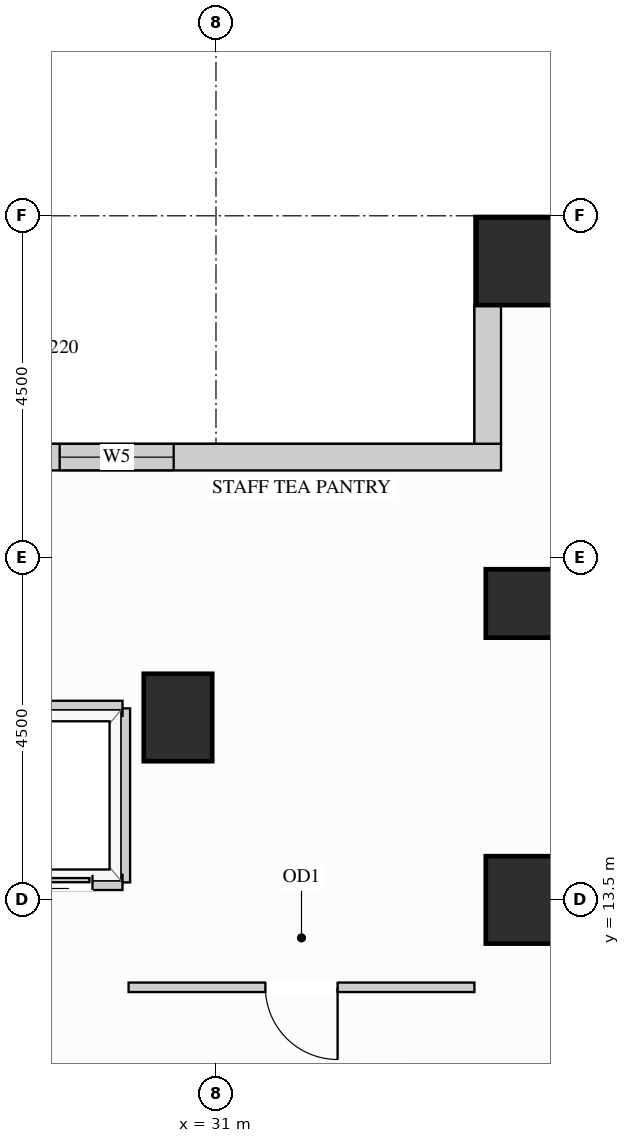
"""IFC4 building model, lengths in metres.
Left out: names, types, materials, properties, quantities, classifications, styles, units other than length and angle.
Written with IfcOpenShell. Run it as: python <this file> out.ifc"""

import sys

from ifc_helpers import new_model, si_unit, direction, frame, frame_2d, origin, origin_2d, place, context, subcontext, project, spatial, rectangle, extrude, source, transform, mapped, element, fill, save


model = new_model("IFC4")
c1 = context("Model", 3, precision=1e-05, world=origin(), true_north=direction((0.0, 1.0)))
c2 = subcontext(c1, "Body", "Model", "MODEL_VIEW")
j1 = project(units=[si_unit("LENGTHUNIT", "METRE"), si_unit("PLANEANGLEUNIT", "RADIAN")], contexts=[c1])
p1 = place(None, origin())
s1 = spatial("IfcSite", under=j1, at=p1, CompositionType="ELEMENT")
p2 = place(p1, origin())
s2 = spatial("IfcBuilding", under=s1, at=p2, CompositionType="ELEMENT")
p3 = place(p2, frame((0.0, 0.0, 127.8)))
s3 = spatial("IfcBuildingStorey", under=s2, at=p3, CompositionType="ELEMENT", Elevation=127.8)
m1 = source(origin(), c2, "Body", "SweptSolid", [
    extrude(rectangle(XDim=0.9, YDim=0.9, at=origin_2d()), origin(), (0.0, 0.0, 1.0), 3.38),
])
p4 = place(p3, frame((35.0, 17.4, 0.0), z_axis=(0.0, 0.0, 1.0), x_axis=(1.0, 0.0, 0.0)))
e1 = element("IfcColumn", 1, at=p4, inside=s3, PredefinedType="COLUMN", context=c2, shape_type="MappedRepresentation", body=[
    mapped(m1, transform((0.0, 0.0, 0.0), x_axis=(1.0, 0.0, 0.0), y_axis=(0.0, 1.0, 0.0), z_axis=(0.0, 0.0, 1.0))),
])
m2 = source(origin(), c2, "Body", "SweptSolid", [
    extrude(rectangle(XDim=0.9, YDim=1.15, at=origin_2d()), origin(), (0.0, 0.0, 1.0), 3.38),
])
for number, where, z_axis, x_axis in (
    (2, (35.0, 13.5, 0.0), (0.0, 0.0, 1.0), (1.0, 0.0, 0.0)),
    (3, (30.5, 15.9, 0.0), (0.0, 0.0, 1.0), (1.0, 0.0, 0.0)),
):
    element("IfcColumn", number, at=place(p3, frame(where, z_axis=z_axis, x_axis=x_axis)), inside=s3, PredefinedType="COLUMN", context=c2, shape_type="MappedRepresentation", body=[
        mapped(m2, transform((0.0, 0.0, 0.0), x_axis=(1.0, 0.0, 0.0), y_axis=(0.0, 1.0, 0.0), z_axis=(0.0, 0.0, 1.0))),
    ])
m3 = source(origin(), c2, "Body", "SweptSolid", [
    extrude(rectangle(XDim=1.15, YDim=1.15, at=origin_2d()), origin(), (0.0, 0.0, 1.0), 3.38),
])
p5 = place(p3, frame((35.0, 21.9, 0.0), z_axis=(0.0, 0.0, 1.0), x_axis=(1.0, 0.0, 0.0)))
e4 = element("IfcColumn", 4, at=p5, inside=s3, PredefinedType="COLUMN", context=c2, shape_type="MappedRepresentation", body=[
    mapped(m3, transform((0.0, 0.0, 0.0), x_axis=(1.0, 0.0, 0.0), y_axis=(0.0, 1.0, 0.0), z_axis=(0.0, 0.0, 1.0))),
])
m4 = source(origin(), c2, "Body", "SweptSolid", [
    extrude(rectangle(XDim=1.829, YDim=0.35, at=frame_2d((0.915, 0.0))), origin(), (0.0, 0.0, 1.0), 3.365),
])
p6 = place(p3, frame((34.575, 21.327, 0.0), z_axis=(0.0, 0.0, 1.0), x_axis=(0.0, -1.0, 0.0)))
e5 = element("IfcWall", 5, at=p6, inside=s3, PredefinedType="SOLIDWALL", context=c2, shape_type="MappedRepresentation", body=[
    mapped(m4, transform((0.0, 0.0, 0.0), x_axis=(1.0, 0.0, 0.0), y_axis=(0.0, 1.0, 0.0), z_axis=(0.0, 0.0, 1.0))),
])
p7 = place(p3, frame((34.75, 19.325, 0.0), z_axis=(0.0, 0.0, 1.0), x_axis=(-1.0, 0.0, 0.0)))
e6 = element("IfcWall", 6, at=p7, inside=s3, PredefinedType="SOLIDWALL", context=c2, shape_type="SweptSolid", body=[
    extrude(rectangle(XDim=15.6, YDim=0.35, at=frame_2d((7.8, 0.0))), origin(), (0.0, 0.0, 1.0), 3.365),
])
p8 = place(p7, frame((4.307, 0.0, 0.78)))
e7 = element("IfcOpeningElement", 7, at=p8, cuts=e6, PredefinedType="OPENING", context=c2, shape_type="SweptSolid", body=[
    extrude(rectangle(XDim=1.5, YDim=2.0, at=frame_2d((0.75, 1.0))), frame((0.0, 0.185, 0.0), z_axis=(0.0, -1.0, 0.0), x_axis=(1.0, 0.0, 0.0)), (0.0, 0.0, 1.0), 0.37),
])
p9 = place(p7, frame((9.793, 0.0, 0.78)))
e8 = element("IfcOpeningElement", 8, at=p9, cuts=e6, PredefinedType="OPENING", context=c2, shape_type="SweptSolid", body=[
    extrude(rectangle(XDim=1.5, YDim=2.0, at=frame_2d((0.75, 1.0))), frame((0.0, 0.185, 0.0), z_axis=(0.0, -1.0, 0.0), x_axis=(1.0, 0.0, 0.0)), (0.0, 0.0, 1.0), 0.37),
])
p10 = place(p3, frame((29.85, 12.35, 0.0), z_axis=(0.0, 0.0, 1.0), x_axis=(1.0, 0.0, 0.0)))
e9 = element("IfcWall", 9, at=p10, inside=s3, PredefinedType="PARTITIONING", context=c2, shape_type="SweptSolid", body=[
    extrude(rectangle(XDim=4.55, YDim=0.125, at=frame_2d((2.275, 0.0))), origin(), (0.0, 0.0, 1.0), 3.365),
])
p11 = place(p10, frame((1.8, 0.0, 0.0)))
e10 = element("IfcOpeningElement", 10, at=p11, cuts=e9, PredefinedType="OPENING", context=c2, shape_type="SweptSolid", body=[
    extrude(rectangle(XDim=0.95, YDim=2.15, at=frame_2d((0.475, 1.075))), frame((0.0, 0.073, 0.0), z_axis=(0.0, -1.0, 0.0), x_axis=(1.0, 0.0, 0.0)), (0.0, 0.0, 1.0), 0.145),
])
m5 = source(origin(), c2, "Body", "SweptSolid", [
    extrude(rectangle(XDim=2.29, YDim=0.2, at=frame_2d((1.145, 0.0))), origin(), (0.0, 0.0, 1.0), 3.365),
])
p12 = place(p3, frame((29.77, 13.73, 0.0), z_axis=(0.0, 0.0, 1.0), x_axis=(0.0, 1.0, 0.0)))
e11 = element("IfcWall", 11, at=p12, inside=s3, PredefinedType="PARTITIONING", context=c2, shape_type="MappedRepresentation", body=[
    mapped(m5, transform((0.0, 0.0, 0.0), x_axis=(1.0, 0.0, 0.0), y_axis=(0.0, 1.0, 0.0), z_axis=(0.0, 0.0, 1.0))),
])
m6 = source(origin(), c2, "Body", "SweptSolid", [
    extrude(rectangle(XDim=1.89, YDim=0.2, at=frame_2d((0.945, 0.0))), origin(), (0.0, 0.0, 1.0), 2.677),
])
p13 = place(p3, frame((27.88, 16.02, 0.0), z_axis=(0.0, 0.0, 1.0), x_axis=(1.0, 0.0, 0.0)))
e12 = element("IfcWall", 12, at=p13, inside=s3, PredefinedType="PARTITIONING", context=c2, shape_type="MappedRepresentation", body=[
    mapped(m6, transform((0.0, 0.0, 0.0), x_axis=(1.0, 0.0, 0.0), y_axis=(0.0, 1.0, 0.0), z_axis=(0.0, 0.0, 1.0))),
])
p14 = place(p3, frame((27.88, 13.73, 0.0), z_axis=(0.0, 0.0, 1.0), x_axis=(1.0, 0.0, 0.0)))
e13 = element("IfcWall", 13, at=p14, inside=s3, PredefinedType="PARTITIONING", context=c2, shape_type="SweptSolid", body=[
    extrude(rectangle(XDim=1.89, YDim=0.2, at=frame_2d((0.945, 0.0))), origin(), (0.0, 0.0, 1.0), 2.446),
])
p15 = place(p14, frame((0.395, 0.0, 0.0)))
e14 = element("IfcOpeningElement", 14, at=p15, cuts=e13, PredefinedType="OPENING", context=c2, shape_type="SweptSolid", body=[
    extrude(rectangle(XDim=1.1, YDim=2.2, at=frame_2d((0.55, 1.1))), frame((0.0, 0.11, 0.0), z_axis=(0.0, -1.0, 0.0), x_axis=(1.0, 0.0, 0.0)), (0.0, 0.0, 1.0), 0.22),
])
m7 = source(origin(), c2, "Body", "SweptSolid", [
    extrude(rectangle(XDim=1.1, YDim=2.2, at=frame_2d((0.55, 1.1))), frame((0.0, 0.025, 0.0), z_axis=(0.0, -1.0, 0.0), x_axis=(1.0, 0.0, 0.0)), (0.0, 0.0, 1.0), 0.05),
])
p16 = place(p15, origin())
e15 = element("IfcDoor", 15, at=p16, inside=s3, OperationType="SLIDING_TO_LEFT", PredefinedType="DOOR", context=c2, shape_type="MappedRepresentation", body=[
    mapped(m7, transform((0.0, 0.0, 0.0), x_axis=(1.0, 0.0, 0.0), y_axis=(0.0, 1.0, 0.0), z_axis=(0.0, 0.0, 1.0))),
])
fill(e14, e15)
m8 = source(origin(), c2, "Body", "SweptSolid", [
    extrude(rectangle(XDim=0.95, YDim=2.15, at=frame_2d((0.475, 1.075))), frame((0.0, 0.025, 0.0), z_axis=(0.0, -1.0, 0.0), x_axis=(1.0, 0.0, 0.0)), (0.0, 0.0, 1.0), 0.05),
])
p17 = place(p11, origin())
e16 = element("IfcDoor", 16, at=p17, inside=s3, OperationType="SINGLE_SWING_RIGHT", PredefinedType="DOOR", context=c2, shape_type="MappedRepresentation", body=[
    mapped(m8, transform((0.0, 0.0, 0.0), x_axis=(1.0, 0.0, 0.0), y_axis=(0.0, 1.0, 0.0), z_axis=(0.0, 0.0, 1.0))),
])
fill(e10, e16)
m9 = source(origin(), c2, "Body", "SweptSolid", [
    extrude(rectangle(XDim=1.5, YDim=2.0, at=frame_2d((0.75, 1.0))), frame((0.0, 0.03, 0.0), z_axis=(0.0, -1.0, 0.0), x_axis=(1.0, 0.0, 0.0)), (0.0, 0.0, 1.0), 0.06),
])
p18 = place(p8, origin())
e17 = element("IfcWindow", 17, at=p18, inside=s3, PartitioningType="SINGLE_PANEL", PredefinedType="WINDOW", context=c2, shape_type="MappedRepresentation", body=[
    mapped(m9, transform((0.0, 0.0, 0.0), x_axis=(1.0, 0.0, 0.0), y_axis=(0.0, 1.0, 0.0), z_axis=(0.0, 0.0, 1.0))),
])
fill(e7, e17)
save(model, sys.argv[1])
